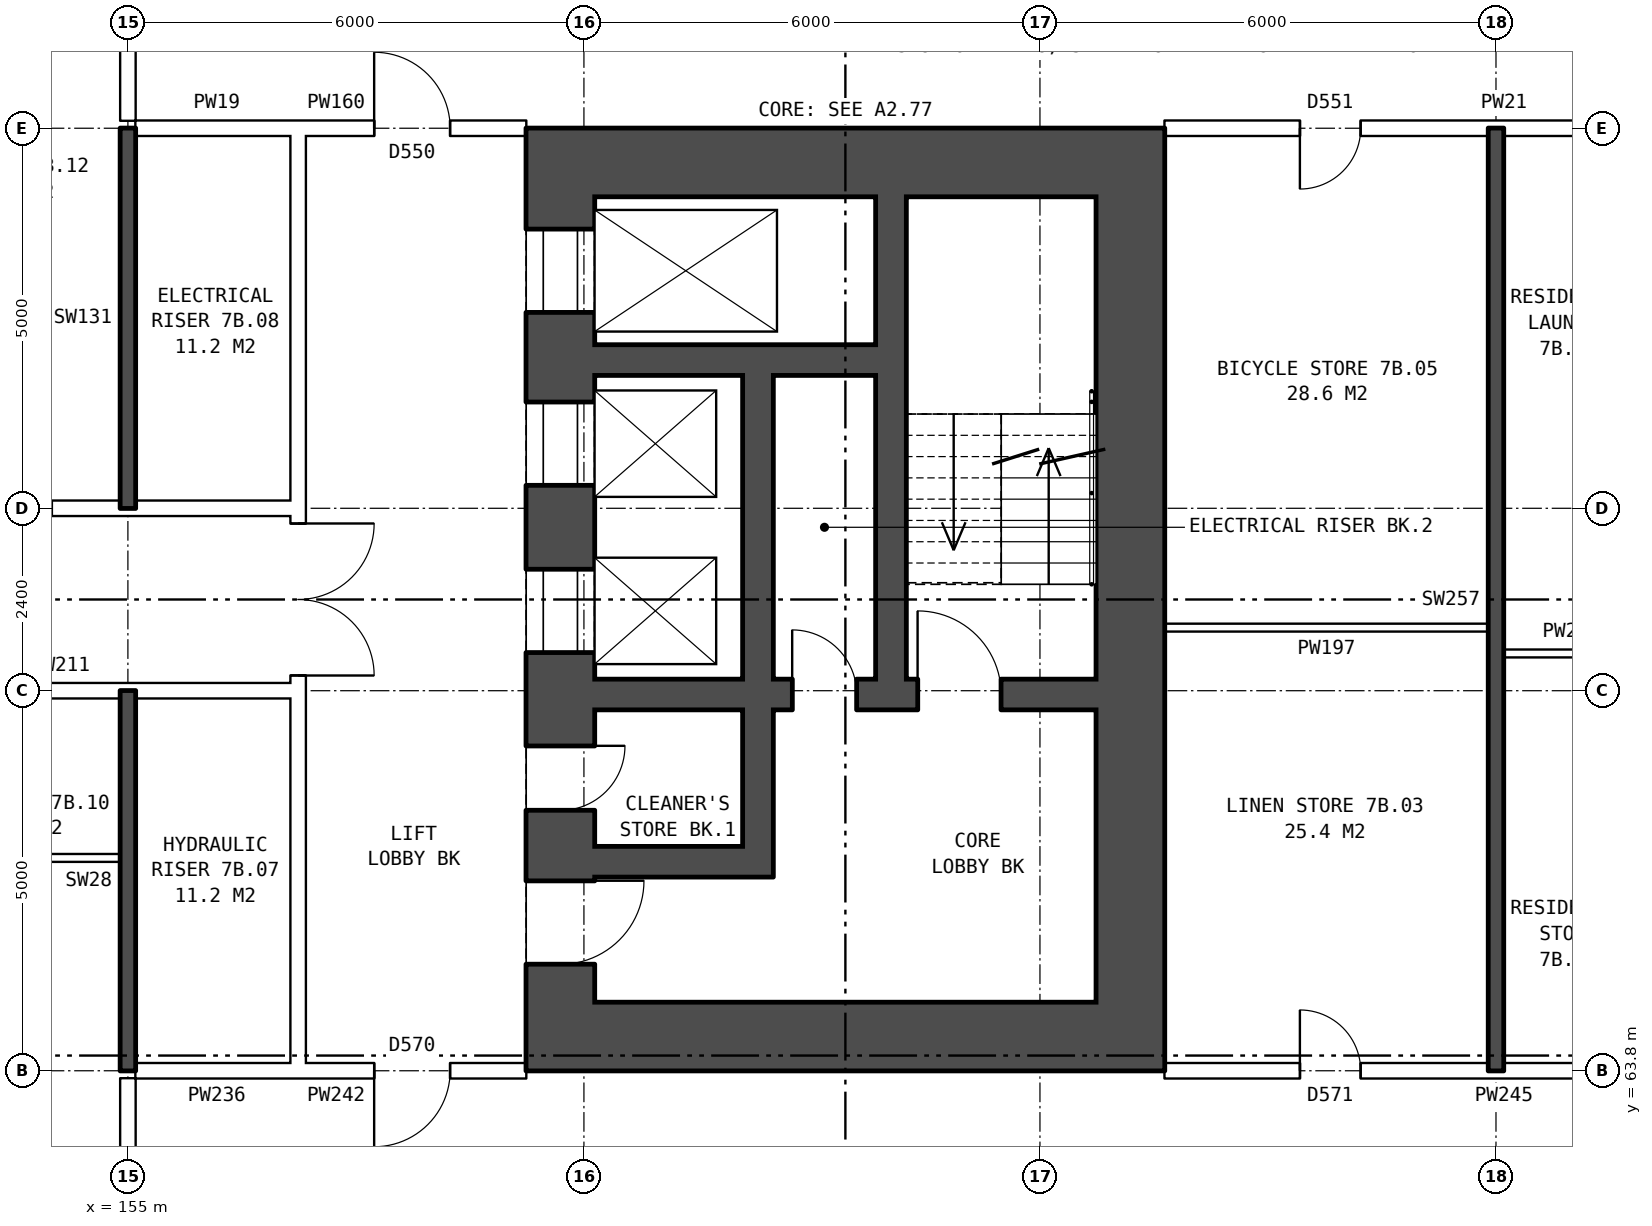
"""IFC4 building model, lengths in metres.
Left out: names, types, materials, properties, quantities, classifications, styles, units other than length and angle.
Written with IfcOpenShell. Run it as: python <this file> out.ifc"""

import sys

from ifc_helpers import new_model, si_unit, direction, frame, frame_2d, origin, place, context, subcontext, project, spatial, rectangle, extrude, element, fill, save


model = new_model("IFC4")
c1 = context("Model", 3, precision=1e-05, world=origin(), true_north=direction((0.0, 1.0)))
c2 = subcontext(c1, "Body", "Model", "MODEL_VIEW")
j1 = project(units=[si_unit("LENGTHUNIT", "METRE"), si_unit("PLANEANGLEUNIT", "RADIAN")], contexts=[c1])
p1 = place(None, origin())
s1 = spatial("IfcSite", under=j1, at=p1, CompositionType="ELEMENT")
p2 = place(p1, origin())
s2 = spatial("IfcBuilding", under=s1, at=p2, CompositionType="ELEMENT")
p3 = place(p2, frame((0.0, 0.0, 28.8)))
s3 = spatial("IfcBuildingStorey", under=s2, at=p3, CompositionType="ELEMENT", Elevation=28.8)
p4 = place(p3, frame((160.69, 75.3, 0.0), z_axis=(0.0, 0.0, 1.0), x_axis=(0.0, -1.0, 0.0)))
e1 = element("IfcWall", 1, at=p4, inside=s3, PredefinedType="SHEAR", context=c2, shape_type="SweptSolid", body=[
    extrude(rectangle(XDim=10.6, YDim=0.9, at=frame_2d((5.3, 0.0))), origin(), (0.0, 0.0, 1.0), 2.85),
])
p5 = place(p4, frame((0.425, 0.0, 0.0)))
e2 = element("IfcOpeningElement", 2, at=p5, cuts=e1, PredefinedType="OPENING", context=c2, shape_type="SweptSolid", body=[
    extrude(rectangle(XDim=1.1, YDim=2.1, at=frame_2d((0.55, 1.05))), frame((0.0, 0.46, 0.0), z_axis=(0.0, -1.0, 0.0), x_axis=(1.0, 0.0, 0.0)), (0.0, 0.0, 1.0), 0.92),
])
p6 = place(p4, frame((2.7, 0.0, 0.0)))
e3 = element("IfcOpeningElement", 3, at=p6, cuts=e1, PredefinedType="OPENING", context=c2, shape_type="SweptSolid", body=[
    extrude(rectangle(XDim=1.1, YDim=2.1, at=frame_2d((0.55, 1.05))), frame((0.0, 0.46, 0.0), z_axis=(0.0, -1.0, 0.0), x_axis=(1.0, 0.0, 0.0)), (0.0, 0.0, 1.0), 0.92),
])
p7 = place(p4, frame((4.9, 0.0, 0.0)))
e4 = element("IfcOpeningElement", 4, at=p7, cuts=e1, PredefinedType="OPENING", context=c2, shape_type="SweptSolid", body=[
    extrude(rectangle(XDim=1.1, YDim=2.1, at=frame_2d((0.55, 1.05))), frame((0.0, 0.46, 0.0), z_axis=(0.0, -1.0, 0.0), x_axis=(1.0, 0.0, 0.0)), (0.0, 0.0, 1.0), 0.92),
])
p8 = place(p4, frame((9.0, 0.0, 0.0)))
e5 = element("IfcOpeningElement", 5, at=p8, cuts=e1, PredefinedType="OPENING", context=c2, shape_type="SweptSolid", body=[
    extrude(rectangle(XDim=1.1, YDim=2.1, at=frame_2d((0.55, 1.05))), frame((0.0, 0.46, 0.0), z_axis=(0.0, -1.0, 0.0), x_axis=(1.0, 0.0, 0.0)), (0.0, 0.0, 1.0), 0.92),
])
p9 = place(p4, frame((7.225, 0.0, 0.0)))
e6 = element("IfcOpeningElement", 6, at=p9, cuts=e1, PredefinedType="OPENING", context=c2, shape_type="SweptSolid", body=[
    extrude(rectangle(XDim=0.85, YDim=2.1, at=frame_2d((0.425, 1.05))), frame((0.0, 0.46, 0.0), z_axis=(0.0, -1.0, 0.0), x_axis=(1.0, 0.0, 0.0)), (0.0, 0.0, 1.0), 0.92),
])
p10 = place(p3, frame((168.19, 75.3, 0.0), z_axis=(0.0, 0.0, 1.0), x_axis=(0.0, -1.0, 0.0)))
e7 = element("IfcWall", 7, at=p10, inside=s3, PredefinedType="SHEAR", context=c2, shape_type="SweptSolid", body=[
    extrude(rectangle(XDim=10.6, YDim=0.9, at=frame_2d((5.3, 0.0))), origin(), (0.0, 0.0, 1.0), 2.85),
])
for number, where, z_axis, x_axis in (
    (8, (160.24, 75.75, 0.0), (0.0, 0.0, 1.0), (1.0, 0.0, 0.0)),
    (9, (160.24, 64.25, 0.0), (0.0, 0.0, 1.0), (1.0, 0.0, 0.0)),
):
    element("IfcWall", number, at=place(p3, frame(where, z_axis=z_axis, x_axis=x_axis)), inside=s3, PredefinedType="SHEAR", context=c2, shape_type="SweptSolid", body=[
        extrude(rectangle(XDim=8.4, YDim=0.9, at=frame_2d((4.2, 0.0))), origin(), (0.0, 0.0, 1.0), 2.85),
    ])
p11 = place(p3, frame((161.14, 73.15, 0.0), z_axis=(0.0, 0.0, 1.0), x_axis=(1.0, 0.0, 0.0)))
e10 = element("IfcWall", 10, at=p11, inside=s3, PredefinedType="SHEAR", context=c2, shape_type="SweptSolid", body=[
    extrude(rectangle(XDim=3.7, YDim=0.4, at=frame_2d((1.85, 0.0))), origin(), (0.0, 0.0, 1.0), 2.85),
])
p12 = place(p3, frame((161.14, 68.75, 0.0), z_axis=(0.0, 0.0, 1.0), x_axis=(1.0, 0.0, 0.0)))
e11 = element("IfcWall", 11, at=p12, inside=s3, PredefinedType="SHEAR", context=c2, shape_type="SweptSolid", body=[
    extrude(rectangle(XDim=6.6, YDim=0.4, at=frame_2d((3.3, 0.0))), origin(), (0.0, 0.0, 1.0), 2.85),
])
p13 = place(p12, frame((4.25, 0.0, 0.0)))
e12 = element("IfcOpeningElement", 12, at=p13, cuts=e11, PredefinedType="OPENING", context=c2, shape_type="SweptSolid", body=[
    extrude(rectangle(XDim=1.1, YDim=2.1, at=frame_2d((0.55, 1.05))), frame((0.0, 0.21, 0.0), z_axis=(0.0, -1.0, 0.0), x_axis=(1.0, 0.0, 0.0)), (0.0, 0.0, 1.0), 0.42),
])
p14 = place(p12, frame((2.6, 0.0, 0.0)))
e13 = element("IfcOpeningElement", 13, at=p14, cuts=e11, PredefinedType="OPENING", context=c2, shape_type="SweptSolid", body=[
    extrude(rectangle(XDim=0.85, YDim=2.1, at=frame_2d((0.425, 1.05))), frame((0.0, 0.21, 0.0), z_axis=(0.0, -1.0, 0.0), x_axis=(1.0, 0.0, 0.0)), (0.0, 0.0, 1.0), 0.42),
])
p15 = place(p3, frame((161.14, 66.55, 0.0), z_axis=(0.0, 0.0, 1.0), x_axis=(1.0, 0.0, 0.0)))
e14 = element("IfcWall", 14, at=p15, inside=s3, PredefinedType="SHEAR", context=c2, shape_type="SweptSolid", body=[
    extrude(rectangle(XDim=1.95, YDim=0.4, at=frame_2d((0.975, 0.0))), origin(), (0.0, 0.0, 1.0), 2.85),
])
p16 = place(p3, frame((163.29, 72.95, 0.0), z_axis=(0.0, 0.0, 1.0), x_axis=(0.0, -1.0, 0.0)))
e15 = element("IfcWall", 15, at=p16, inside=s3, PredefinedType="SHEAR", context=c2, shape_type="SweptSolid", body=[
    extrude(rectangle(XDim=4.0, YDim=0.4, at=frame_2d((2.0, 0.0))), origin(), (0.0, 0.0, 1.0), 2.85),
])
p17 = place(p3, frame((163.29, 68.55, 0.0), z_axis=(0.0, 0.0, 1.0), x_axis=(0.0, -1.0, 0.0)))
e16 = element("IfcWall", 16, at=p17, inside=s3, PredefinedType="SHEAR", context=c2, shape_type="SweptSolid", body=[
    extrude(rectangle(XDim=2.2, YDim=0.4, at=frame_2d((1.1, 0.0))), origin(), (0.0, 0.0, 1.0), 2.85),
])
p18 = place(p3, frame((165.04, 75.3, 0.0), z_axis=(0.0, 0.0, 1.0), x_axis=(0.0, -1.0, 0.0)))
e17 = element("IfcWall", 17, at=p18, inside=s3, PredefinedType="SHEAR", context=c2, shape_type="SweptSolid", body=[
    extrude(rectangle(XDim=6.35, YDim=0.4, at=frame_2d((3.175, 0.0))), origin(), (0.0, 0.0, 1.0), 2.85),
])
p19 = place(p3, frame((157.24, 63.9, 0.0), z_axis=(0.0, 0.0, 1.0), x_axis=(0.0, 1.0, 0.0)))
e18 = element("IfcWall", 18, at=p19, inside=s3, PredefinedType="PARTITIONING", context=c2, shape_type="SweptSolid", body=[
    extrude(rectangle(XDim=12.2, YDim=0.2, at=frame_2d((6.1, 0.0))), origin(), (0.0, 0.0, 1.0), 2.85),
])
p20 = place(p19, frame((5.1, 0.0, 0.0)))
e19 = element("IfcOpeningElement", 19, at=p20, cuts=e18, PredefinedType="OPENING", context=c2, shape_type="SweptSolid", body=[
    extrude(rectangle(XDim=2.0, YDim=2.1, at=frame_2d((1.0, 1.05))), frame((0.0, 0.11, 0.0), z_axis=(0.0, -1.0, 0.0), x_axis=(1.0, 0.0, 0.0)), (0.0, 0.0, 1.0), 0.22),
])
p21 = place(p3, frame((155.1, 63.8, 0.0), z_axis=(0.0, 0.0, 1.0), x_axis=(1.0, 0.0, 0.0)))
e20 = element("IfcWall", 20, at=p21, inside=s3, PredefinedType="PARTITIONING", context=c2, shape_type="SweptSolid", body=[
    extrude(rectangle(XDim=2.14, YDim=0.2, at=frame_2d((1.07, 0.0))), origin(), (0.0, 0.0, 1.0), 2.85),
])
p22 = place(p3, frame((157.24, 63.8, 0.0), z_axis=(0.0, 0.0, 1.0), x_axis=(1.0, 0.0, 0.0)))
e21 = element("IfcWall", 21, at=p22, inside=s3, PredefinedType="PARTITIONING", context=c2, shape_type="SweptSolid", body=[
    extrude(rectangle(XDim=3.0, YDim=0.2, at=frame_2d((1.5, 0.0))), origin(), (0.0, 0.0, 1.0), 2.85),
])
p23 = place(p22, frame((1.0, 0.0, 0.0)))
e22 = element("IfcOpeningElement", 22, at=p23, cuts=e21, PredefinedType="OPENING", context=c2, shape_type="SweptSolid", body=[
    extrude(rectangle(XDim=1.0, YDim=2.1, at=frame_2d((0.5, 1.05))), frame((0.0, 0.11, 0.0), z_axis=(0.0, -1.0, 0.0), x_axis=(1.0, 0.0, 0.0)), (0.0, 0.0, 1.0), 0.22),
])
p24 = place(p3, frame((168.64, 63.8, 0.0), z_axis=(0.0, 0.0, 1.0), x_axis=(1.0, 0.0, 0.0)))
e23 = element("IfcWall", 23, at=p24, inside=s3, PredefinedType="PARTITIONING", context=c2, shape_type="SweptSolid", body=[
    extrude(rectangle(XDim=6.35, YDim=0.2, at=frame_2d((3.175, 0.0))), origin(), (0.0, 0.0, 1.0), 2.85),
])
p25 = place(p24, frame((1.78, 0.0, 0.0)))
e24 = element("IfcOpeningElement", 24, at=p25, cuts=e23, PredefinedType="OPENING", context=c2, shape_type="SweptSolid", body=[
    extrude(rectangle(XDim=0.8, YDim=2.1, at=frame_2d((0.4, 1.05))), frame((0.0, 0.11, 0.0), z_axis=(0.0, -1.0, 0.0), x_axis=(1.0, 0.0, 0.0)), (0.0, 0.0, 1.0), 0.22),
])
p26 = place(p3, frame((152.0, 66.6, 0.0), z_axis=(0.0, 0.0, 1.0), x_axis=(1.0, 0.0, 0.0)))
e25 = element("IfcWall", 25, at=p26, inside=s3, PredefinedType="PARTITIONING", context=c2, shape_type="SweptSolid", body=[
    extrude(rectangle(XDim=2.9, YDim=0.1, at=frame_2d((1.45, 0.0))), origin(), (0.0, 0.0, 1.0), 2.85),
])
p27 = place(p3, frame((142.76, 68.8, 0.0), z_axis=(0.0, 0.0, 1.0), x_axis=(1.0, 0.0, 0.0)))
e26 = element("IfcWall", 26, at=p27, inside=s3, PredefinedType="PARTITIONING", context=c2, shape_type="SweptSolid", body=[
    extrude(rectangle(XDim=14.48, YDim=0.2, at=frame_2d((7.24, 0.0))), origin(), (0.0, 0.0, 1.0), 2.85),
])
p28 = place(p27, frame((1.12, 0.0, 0.0)))
e27 = element("IfcOpeningElement", 27, at=p28, cuts=e26, PredefinedType="OPENING", context=c2, shape_type="SweptSolid", body=[
    extrude(rectangle(XDim=1.0, YDim=2.1, at=frame_2d((0.5, 1.05))), frame((0.0, 0.11, 0.0), z_axis=(0.0, -1.0, 0.0), x_axis=(1.0, 0.0, 0.0)), (0.0, 0.0, 1.0), 0.22),
])
p29 = place(p27, frame((7.24, 0.0, 0.0)))
e28 = element("IfcOpeningElement", 28, at=p29, cuts=e26, PredefinedType="OPENING", context=c2, shape_type="SweptSolid", body=[
    extrude(rectangle(XDim=1.0, YDim=2.1, at=frame_2d((0.5, 1.05))), frame((0.0, 0.11, 0.0), z_axis=(0.0, -1.0, 0.0), x_axis=(1.0, 0.0, 0.0)), (0.0, 0.0, 1.0), 0.22),
])
p30 = place(p3, frame((173.1, 69.29, 0.0), z_axis=(0.0, 0.0, 1.0), x_axis=(1.0, 0.0, 0.0)))
e29 = element("IfcWall", 29, at=p30, inside=s3, PredefinedType="PARTITIONING", context=c2, shape_type="SweptSolid", body=[
    extrude(rectangle(XDim=1.79, YDim=0.1, at=frame_2d((0.895, 0.0))), origin(), (0.0, 0.0, 1.0), 2.85),
])
p31 = place(p3, frame((168.64, 69.63, 0.0), z_axis=(0.0, 0.0, 1.0), x_axis=(1.0, 0.0, 0.0)))
e30 = element("IfcWall", 30, at=p31, inside=s3, PredefinedType="PARTITIONING", context=c2, shape_type="SweptSolid", body=[
    extrude(rectangle(XDim=4.26, YDim=0.1, at=frame_2d((2.13, 0.0))), origin(), (0.0, 0.0, 1.0), 2.85),
])
p32 = place(p3, frame((142.76, 71.2, 0.0), z_axis=(0.0, 0.0, 1.0), x_axis=(1.0, 0.0, 0.0)))
e31 = element("IfcWall", 31, at=p32, inside=s3, PredefinedType="PARTITIONING", context=c2, shape_type="SweptSolid", body=[
    extrude(rectangle(XDim=14.48, YDim=0.2, at=frame_2d((7.24, 0.0))), origin(), (0.0, 0.0, 1.0), 2.85),
])
p33 = place(p32, frame((1.12, 0.0, 0.0)))
e32 = element("IfcOpeningElement", 32, at=p33, cuts=e31, PredefinedType="OPENING", context=c2, shape_type="SweptSolid", body=[
    extrude(rectangle(XDim=1.0, YDim=2.1, at=frame_2d((0.5, 1.05))), frame((0.0, 0.11, 0.0), z_axis=(0.0, -1.0, 0.0), x_axis=(1.0, 0.0, 0.0)), (0.0, 0.0, 1.0), 0.22),
])
p34 = place(p32, frame((10.24, 0.0, 0.0)))
e33 = element("IfcOpeningElement", 33, at=p34, cuts=e31, PredefinedType="OPENING", context=c2, shape_type="SweptSolid", body=[
    extrude(rectangle(XDim=1.0, YDim=2.1, at=frame_2d((0.5, 1.05))), frame((0.0, 0.11, 0.0), z_axis=(0.0, -1.0, 0.0), x_axis=(1.0, 0.0, 0.0)), (0.0, 0.0, 1.0), 0.22),
])
p35 = place(p3, frame((155.1, 76.2, 0.0), z_axis=(0.0, 0.0, 1.0), x_axis=(1.0, 0.0, 0.0)))
e34 = element("IfcWall", 34, at=p35, inside=s3, PredefinedType="PARTITIONING", context=c2, shape_type="SweptSolid", body=[
    extrude(rectangle(XDim=2.14, YDim=0.2, at=frame_2d((1.07, 0.0))), origin(), (0.0, 0.0, 1.0), 2.85),
])
p36 = place(p3, frame((157.24, 76.2, 0.0), z_axis=(0.0, 0.0, 1.0), x_axis=(1.0, 0.0, 0.0)))
e35 = element("IfcWall", 35, at=p36, inside=s3, PredefinedType="PARTITIONING", context=c2, shape_type="SweptSolid", body=[
    extrude(rectangle(XDim=3.0, YDim=0.2, at=frame_2d((1.5, 0.0))), origin(), (0.0, 0.0, 1.0), 2.85),
])
p37 = place(p36, frame((1.0, 0.0, 0.0)))
e36 = element("IfcOpeningElement", 36, at=p37, cuts=e35, PredefinedType="OPENING", context=c2, shape_type="SweptSolid", body=[
    extrude(rectangle(XDim=1.0, YDim=2.1, at=frame_2d((0.5, 1.05))), frame((0.0, 0.11, 0.0), z_axis=(0.0, -1.0, 0.0), x_axis=(1.0, 0.0, 0.0)), (0.0, 0.0, 1.0), 0.22),
])
p38 = place(p3, frame((168.64, 76.2, 0.0), z_axis=(0.0, 0.0, 1.0), x_axis=(1.0, 0.0, 0.0)))
e37 = element("IfcWall", 37, at=p38, inside=s3, PredefinedType="PARTITIONING", context=c2, shape_type="SweptSolid", body=[
    extrude(rectangle(XDim=6.35, YDim=0.2, at=frame_2d((3.175, 0.0))), origin(), (0.0, 0.0, 1.0), 2.85),
])
p39 = place(p38, frame((1.78, 0.0, 0.0)))
e38 = element("IfcOpeningElement", 38, at=p39, cuts=e37, PredefinedType="OPENING", context=c2, shape_type="SweptSolid", body=[
    extrude(rectangle(XDim=0.8, YDim=2.1, at=frame_2d((0.4, 1.05))), frame((0.0, 0.11, 0.0), z_axis=(0.0, -1.0, 0.0), x_axis=(1.0, 0.0, 0.0)), (0.0, 0.0, 1.0), 0.22),
])
p40 = place(p3, frame((155.0, 61.5, 0.0), z_axis=(0.0, 0.0, 1.0), x_axis=(0.0, 1.0, 0.0)))
e39 = element("IfcWall", 39, at=p40, inside=s3, PredefinedType="PARTITIONING", context=c2, shape_type="SweptSolid", body=[
    extrude(rectangle(XDim=2.2, YDim=0.2, at=frame_2d((1.1, 0.0))), origin(), (0.0, 0.0, 1.0), 2.85),
])
for number, where, z_axis, x_axis in (
    (40, (155.0, 63.8, 0.0), (0.0, 0.0, 1.0), (0.0, 1.0, 0.0)),
    (41, (155.0, 71.2, 0.0), (0.0, 0.0, 1.0), (0.0, 1.0, 0.0)),
):
    element("IfcWall", number, at=place(p3, frame(where, z_axis=z_axis, x_axis=x_axis)), inside=s3, PredefinedType="SOLIDWALL", context=c2, shape_type="SweptSolid", body=[
        extrude(rectangle(XDim=5.0, YDim=0.2, at=frame_2d((2.5, 0.0))), origin(), (0.0, 0.0, 1.0), 2.85),
    ])
p41 = place(p3, frame((155.0, 76.3, 0.0), z_axis=(0.0, 0.0, 1.0), x_axis=(0.0, 1.0, 0.0)))
e42 = element("IfcWall", 42, at=p41, inside=s3, PredefinedType="PARTITIONING", context=c2, shape_type="SweptSolid", body=[
    extrude(rectangle(XDim=2.2, YDim=0.2, at=frame_2d((1.1, 0.0))), origin(), (0.0, 0.0, 1.0), 2.85),
])
p42 = place(p3, frame((173.0, 63.8, 0.0), z_axis=(0.0, 0.0, 1.0), x_axis=(0.0, 1.0, 0.0)))
e43 = element("IfcWall", 43, at=p42, inside=s3, PredefinedType="SOLIDWALL", context=c2, shape_type="SweptSolid", body=[
    extrude(rectangle(XDim=12.4, YDim=0.2, at=frame_2d((6.2, 0.0))), origin(), (0.0, 0.0, 1.0), 2.85),
])
p43 = place(p5, origin())
e44 = element("IfcDoor", 44, at=p43, inside=s3, OperationType="DOUBLE_DOOR_SLIDING", PredefinedType="DOOR", context=c2, shape_type="SweptSolid", body=[
    extrude(rectangle(XDim=1.1, YDim=2.1, at=frame_2d((0.55, 1.05))), frame((0.0, 0.435, 0.0), z_axis=(0.0, -1.0, 0.0), x_axis=(1.0, 0.0, 0.0)), (0.0, 0.0, 1.0), 0.05),
])
fill(e2, e44)
p44 = place(p6, origin())
e45 = element("IfcDoor", 45, at=p44, inside=s3, OperationType="DOUBLE_DOOR_SLIDING", PredefinedType="DOOR", context=c2, shape_type="SweptSolid", body=[
    extrude(rectangle(XDim=1.1, YDim=2.1, at=frame_2d((0.55, 1.05))), frame((0.0, 0.435, 0.0), z_axis=(0.0, -1.0, 0.0), x_axis=(1.0, 0.0, 0.0)), (0.0, 0.0, 1.0), 0.05),
])
fill(e3, e45)
p45 = place(p7, origin())
e46 = element("IfcDoor", 46, at=p45, inside=s3, OperationType="DOUBLE_DOOR_SLIDING", PredefinedType="DOOR", context=c2, shape_type="SweptSolid", body=[
    extrude(rectangle(XDim=1.1, YDim=2.1, at=frame_2d((0.55, 1.05))), frame((0.0, 0.435, 0.0), z_axis=(0.0, -1.0, 0.0), x_axis=(1.0, 0.0, 0.0)), (0.0, 0.0, 1.0), 0.05),
])
fill(e4, e46)
p46 = place(p8, origin())
e47 = element("IfcDoor", 47, at=p46, inside=s3, OperationType="SINGLE_SWING_LEFT", PredefinedType="DOOR", context=c2, shape_type="SweptSolid", body=[
    extrude(rectangle(XDim=1.1, YDim=2.1, at=frame_2d((0.55, 1.05))), frame((0.0, 0.435, 0.0), z_axis=(0.0, -1.0, 0.0), x_axis=(1.0, 0.0, 0.0)), (0.0, 0.0, 1.0), 0.05),
])
fill(e5, e47)
p47 = place(p13, origin())
e48 = element("IfcDoor", 48, at=p47, inside=s3, OperationType="SINGLE_SWING_LEFT", PredefinedType="DOOR", context=c2, shape_type="SweptSolid", body=[
    extrude(rectangle(XDim=1.1, YDim=2.1, at=frame_2d((0.55, 1.05))), frame((0.0, 0.025, 0.0), z_axis=(0.0, -1.0, 0.0), x_axis=(1.0, 0.0, 0.0)), (0.0, 0.0, 1.0), 0.05),
])
fill(e12, e48)
p48 = place(p9, origin())
e49 = element("IfcDoor", 49, at=p48, inside=s3, OperationType="SINGLE_SWING_LEFT", PredefinedType="DOOR", context=c2, shape_type="SweptSolid", body=[
    extrude(rectangle(XDim=0.85, YDim=2.1, at=frame_2d((0.425, 1.05))), frame((0.0, 0.435, 0.0), z_axis=(0.0, -1.0, 0.0), x_axis=(1.0, 0.0, 0.0)), (0.0, 0.0, 1.0), 0.05),
])
fill(e6, e49)
p49 = place(p14, origin())
e50 = element("IfcDoor", 50, at=p49, inside=s3, OperationType="SINGLE_SWING_LEFT", PredefinedType="DOOR", context=c2, shape_type="SweptSolid", body=[
    extrude(rectangle(XDim=0.85, YDim=2.1, at=frame_2d((0.425, 1.05))), frame((0.0, 0.025, 0.0), z_axis=(0.0, -1.0, 0.0), x_axis=(1.0, 0.0, 0.0)), (0.0, 0.0, 1.0), 0.05),
])
fill(e13, e50)
p50 = place(p20, frame((2.0, 0.0, 0.0), z_axis=(0.0, 0.0, 1.0), x_axis=(-1.0, 0.0, 0.0)))
e51 = element("IfcDoor", 51, at=p50, inside=s3, OperationType="DOUBLE_DOOR_SINGLE_SWING", PredefinedType="DOOR", context=c2, shape_type="SweptSolid", body=[
    extrude(rectangle(XDim=2.0, YDim=2.1, at=frame_2d((1.0, 1.05))), frame((0.0, 0.025, 0.0), z_axis=(0.0, -1.0, 0.0), x_axis=(1.0, 0.0, 0.0)), (0.0, 0.0, 1.0), 0.05),
])
fill(e19, e51)
p51 = place(p23, frame((1.0, 0.0, 0.0), z_axis=(0.0, 0.0, 1.0), x_axis=(-1.0, 0.0, 0.0)))
e52 = element("IfcDoor", 52, at=p51, inside=s3, OperationType="SINGLE_SWING_RIGHT", PredefinedType="DOOR", context=c2, shape_type="SweptSolid", body=[
    extrude(rectangle(XDim=1.0, YDim=2.1, at=frame_2d((0.5, 1.05))), frame((0.0, 0.025, 0.0), z_axis=(0.0, -1.0, 0.0), x_axis=(1.0, 0.0, 0.0)), (0.0, 0.0, 1.0), 0.05),
])
fill(e22, e52)
p52 = place(p37, origin())
e53 = element("IfcDoor", 53, at=p52, inside=s3, OperationType="SINGLE_SWING_LEFT", PredefinedType="DOOR", context=c2, shape_type="SweptSolid", body=[
    extrude(rectangle(XDim=1.0, YDim=2.1, at=frame_2d((0.5, 1.05))), frame((0.0, 0.025, 0.0), z_axis=(0.0, -1.0, 0.0), x_axis=(1.0, 0.0, 0.0)), (0.0, 0.0, 1.0), 0.05),
])
fill(e36, e53)
p53 = place(p25, origin())
e54 = element("IfcDoor", 54, at=p53, inside=s3, OperationType="SINGLE_SWING_LEFT", PredefinedType="DOOR", context=c2, shape_type="SweptSolid", body=[
    extrude(rectangle(XDim=0.8, YDim=2.1, at=frame_2d((0.4, 1.05))), frame((0.0, 0.025, 0.0), z_axis=(0.0, -1.0, 0.0), x_axis=(1.0, 0.0, 0.0)), (0.0, 0.0, 1.0), 0.05),
])
fill(e24, e54)
p54 = place(p39, frame((0.8, 0.0, 0.0), z_axis=(0.0, 0.0, 1.0), x_axis=(-1.0, 0.0, 0.0)))
e55 = element("IfcDoor", 55, at=p54, inside=s3, OperationType="SINGLE_SWING_RIGHT", PredefinedType="DOOR", context=c2, shape_type="SweptSolid", body=[
    extrude(rectangle(XDim=0.8, YDim=2.1, at=frame_2d((0.4, 1.05))), frame((0.0, 0.025, 0.0), z_axis=(0.0, -1.0, 0.0), x_axis=(1.0, 0.0, 0.0)), (0.0, 0.0, 1.0), 0.05),
])
fill(e38, e55)
save(model, sys.argv[1])
